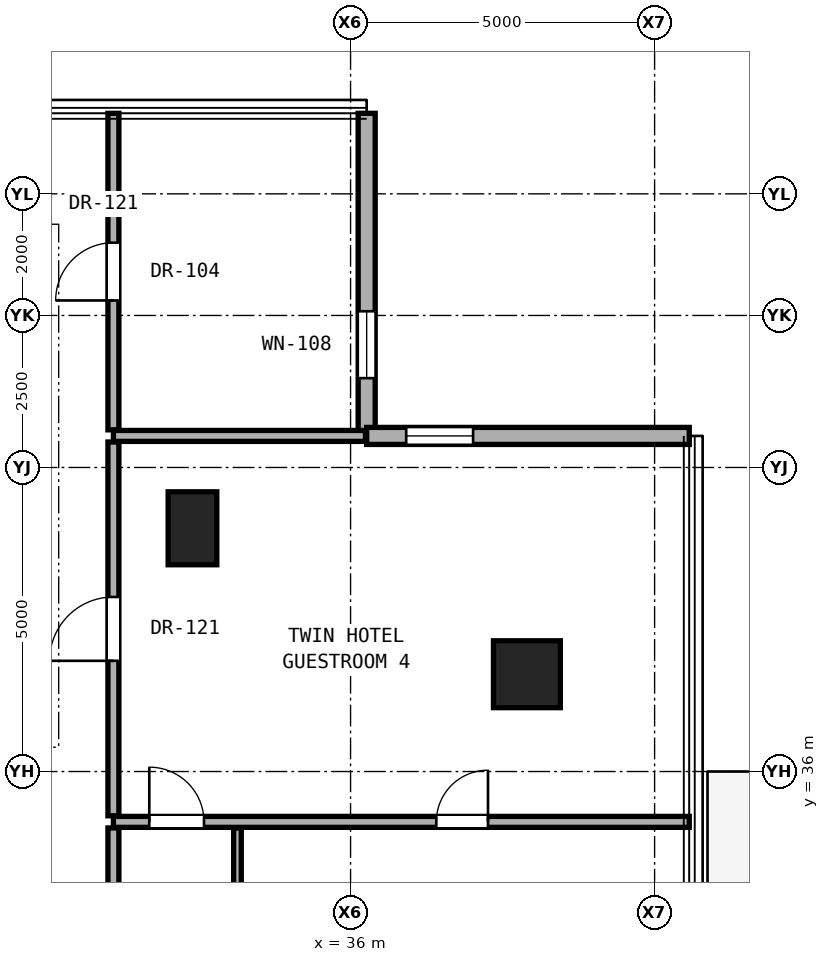
"""IFC4 building model, lengths in metres.
Left out: names, types, materials, properties, quantities, classifications, styles, units other than length and angle.
Written with IfcOpenShell. Run it as: python <this file> out.ifc"""

import sys

from ifc_helpers import new_model, si_unit, direction, frame, frame_2d, origin, origin_2d, place, context, subcontext, project, spatial, rectangle, hollow_rectangle, extrude, element, fill, save


model = new_model("IFC4")
c1 = context("Model", 3, precision=1e-05, world=origin(), true_north=direction((0.0, 1.0)))
c2 = subcontext(c1, "Body", "Model", "MODEL_VIEW")
j1 = project(units=[si_unit("LENGTHUNIT", "METRE"), si_unit("PLANEANGLEUNIT", "RADIAN")], contexts=[c1])
p1 = place(None, origin())
s1 = spatial("IfcSite", under=j1, at=p1, CompositionType="ELEMENT")
p2 = place(p1, origin())
s2 = spatial("IfcBuilding", under=s1, at=p2, CompositionType="ELEMENT")
p3 = place(p2, frame((0.0, 0.0, 98.3)))
s3 = spatial("IfcBuildingStorey", under=s2, at=p3, CompositionType="ELEMENT", Elevation=98.3)
p4 = place(p3, frame((38.9, 37.6, 0.0), z_axis=(0.0, 0.0, 1.0), x_axis=(1.0, 0.0, 0.0)))
e1 = element("IfcColumn", 1, at=p4, inside=s3, PredefinedType="COLUMN", context=c2, shape_type="SweptSolid", body=[
    extrude(hollow_rectangle(XDim=1.1, YDim=1.1, WallThickness=0.06, at=origin_2d()), origin(), (0.0, 0.0, 1.0), 3.3),
])
p5 = place(p3, frame((33.4, 40.0, 0.0), z_axis=(0.0, 0.0, 1.0), x_axis=(1.0, 0.0, 0.0)))
e2 = element("IfcColumn", 2, at=p5, inside=s3, PredefinedType="PILASTER", context=c2, shape_type="SweptSolid", body=[
    extrude(rectangle(XDim=0.8, YDim=1.2, at=origin_2d()), origin(), (0.0, 0.0, 1.0), 3.3),
])
p6 = place(p3, frame((36.265, 41.519, 0.0), z_axis=(0.0, 0.0, 1.0), x_axis=(0.0, 1.0, 0.0)))
e3 = element("IfcWall", 3, at=p6, inside=s3, PredefinedType="SOLIDWALL", context=c2, shape_type="SweptSolid", body=[
    extrude(rectangle(XDim=5.305, YDim=0.28, at=frame_2d((2.652, 0.0))), origin(), (0.0, 0.0, 1.0), 3.06),
])
p7 = place(p6, frame((0.95, 0.0, 0.85)))
e4 = element("IfcOpeningElement", 4, at=p7, cuts=e3, PredefinedType="OPENING", context=c2, shape_type="SweptSolid", body=[
    extrude(rectangle(XDim=1.1, YDim=2.0, at=frame_2d((0.55, 1.0))), frame((0.0, 0.15, 0.0), z_axis=(0.0, -1.0, 0.0), x_axis=(1.0, 0.0, 0.0)), (0.0, 0.0, 1.0), 0.3),
])
p8 = place(p3, frame((41.57, 41.519, 0.0), z_axis=(0.0, 0.0, 1.0), x_axis=(-1.0, 0.0, 0.0)))
e5 = element("IfcWall", 5, at=p8, inside=s3, PredefinedType="SOLIDWALL", context=c2, shape_type="SweptSolid", body=[
    extrude(rectangle(XDim=5.305, YDim=0.28, at=frame_2d((2.653, 0.0))), origin(), (0.0, 0.0, 1.0), 3.06),
])
p9 = place(p8, frame((3.555, 0.0, 0.85)))
e6 = element("IfcOpeningElement", 6, at=p9, cuts=e5, PredefinedType="OPENING", context=c2, shape_type="SweptSolid", body=[
    extrude(rectangle(XDim=1.1, YDim=2.0, at=frame_2d((0.55, 1.0))), frame((0.0, 0.15, 0.0), z_axis=(0.0, -1.0, 0.0), x_axis=(1.0, 0.0, 0.0)), (0.0, 0.0, 1.0), 0.3),
])
p10 = place(p3, frame((32.1, 35.172, 0.0), z_axis=(0.0, 0.0, 1.0), x_axis=(1.0, 0.0, 0.0)))
e7 = element("IfcWall", 7, at=p10, inside=s3, PredefinedType="PARTITIONING", context=c2, shape_type="SweptSolid", body=[
    extrude(rectangle(XDim=9.47, YDim=0.18, at=frame_2d((4.735, 0.0))), origin(), (0.0, 0.0, 1.0), 2.145),
])
p11 = place(p10, frame((5.31, 0.0, 0.0)))
e8 = element("IfcOpeningElement", 8, at=p11, cuts=e7, PredefinedType="OPENING", context=c2, shape_type="SweptSolid", body=[
    extrude(rectangle(XDim=0.85, YDim=2.01, at=frame_2d((0.425, 1.005))), frame((0.0, 0.1, 0.0), z_axis=(0.0, -1.0, 0.0), x_axis=(1.0, 0.0, 0.0)), (0.0, 0.0, 1.0), 0.2),
])
p12 = place(p10, frame((0.59, 0.0, 0.0)))
e9 = element("IfcOpeningElement", 9, at=p12, cuts=e7, PredefinedType="OPENING", context=c2, shape_type="SweptSolid", body=[
    extrude(rectangle(XDim=0.9, YDim=2.1, at=frame_2d((0.45, 1.05))), frame((0.0, 0.1, 0.0), z_axis=(0.0, -1.0, 0.0), x_axis=(1.0, 0.0, 0.0)), (0.0, 0.0, 1.0), 0.2),
])
p13 = place(p3, frame((32.1, 41.519, 0.0), z_axis=(0.0, 0.0, 1.0), x_axis=(1.0, 0.0, 0.0)))
e10 = element("IfcWall", 10, at=p13, inside=s3, PredefinedType="PARTITIONING", context=c2, shape_type="SweptSolid", body=[
    extrude(rectangle(XDim=4.145, YDim=0.18, at=frame_2d((2.073, 0.0))), origin(), (0.0, 0.0, 1.0), 3.08),
])
p14 = place(p3, frame((32.1, 32.972, 0.0), z_axis=(0.0, 0.0, 1.0), x_axis=(0.0, 1.0, 0.0)))
e11 = element("IfcWall", 11, at=p14, inside=s3, PredefinedType="PARTITIONING", context=c2, shape_type="SweptSolid", body=[
    extrude(rectangle(XDim=2.1, YDim=0.18, at=frame_2d((1.05, 0.0))), origin(), (0.0, 0.0, 1.0), 3.08),
])
p15 = place(p3, frame((32.1, 35.272, 0.0), z_axis=(0.0, 0.0, 1.0), x_axis=(0.0, 1.0, 0.0)))
e12 = element("IfcWall", 12, at=p15, inside=s3, PredefinedType="PARTITIONING", context=c2, shape_type="SweptSolid", body=[
    extrude(rectangle(XDim=6.147, YDim=0.18, at=frame_2d((3.073, 0.0))), origin(), (0.0, 0.0, 1.0), 2.456),
])
p16 = place(p15, frame((2.549, 0.0, 0.0)))
e13 = element("IfcOpeningElement", 13, at=p16, cuts=e12, PredefinedType="OPENING", context=c2, shape_type="SweptSolid", body=[
    extrude(rectangle(XDim=1.05, YDim=2.2, at=frame_2d((0.525, 1.1))), frame((0.0, 0.1, 0.0), z_axis=(0.0, -1.0, 0.0), x_axis=(1.0, 0.0, 0.0)), (0.0, 0.0, 1.0), 0.2),
])
p17 = place(p3, frame((32.1, 41.619, 0.0), z_axis=(0.0, 0.0, 1.0), x_axis=(0.0, 1.0, 0.0)))
e14 = element("IfcWall", 14, at=p17, inside=s3, PredefinedType="PARTITIONING", context=c2, shape_type="SweptSolid", body=[
    extrude(rectangle(XDim=5.205, YDim=0.18, at=frame_2d((2.603, 0.0))), origin(), (0.0, 0.0, 1.0), 3.08),
])
p18 = place(p17, frame((2.127, 0.0, 0.0)))
e15 = element("IfcOpeningElement", 15, at=p18, cuts=e14, PredefinedType="OPENING", context=c2, shape_type="SweptSolid", body=[
    extrude(rectangle(XDim=0.95, YDim=2.15, at=frame_2d((0.475, 1.075))), frame((0.0, 0.1, 0.0), z_axis=(0.0, -1.0, 0.0), x_axis=(1.0, 0.0, 0.0)), (0.0, 0.0, 1.0), 0.2),
])
p19 = place(p3, frame((34.14, 32.972, 0.0), z_axis=(0.0, 0.0, 1.0), x_axis=(0.0, 1.0, 0.0)))
e16 = element("IfcWall", 16, at=p19, inside=s3, PredefinedType="PARTITIONING", context=c2, shape_type="SweptSolid", body=[
    extrude(rectangle(XDim=2.1, YDim=0.125, at=frame_2d((1.05, 0.0))), origin(), (0.0, 0.0, 1.0), 3.08),
])
p20 = place(p7, origin())
e17 = element("IfcWindow", 17, at=p20, inside=s3, PartitioningType="SINGLE_PANEL", PredefinedType="WINDOW", context=c2, shape_type="SweptSolid", body=[
    extrude(rectangle(XDim=1.1, YDim=2.0, at=frame_2d((0.55, 1.0))), frame((0.0, 0.03, 0.0), z_axis=(0.0, -1.0, 0.0), x_axis=(1.0, 0.0, 0.0)), (0.0, 0.0, 1.0), 0.06),
])
fill(e4, e17)
p21 = place(p9, origin())
e18 = element("IfcWindow", 18, at=p21, inside=s3, PartitioningType="SINGLE_PANEL", PredefinedType="WINDOW", context=c2, shape_type="SweptSolid", body=[
    extrude(rectangle(XDim=1.1, YDim=2.0, at=frame_2d((0.55, 1.0))), frame((0.0, 0.03, 0.0), z_axis=(0.0, -1.0, 0.0), x_axis=(1.0, 0.0, 0.0)), (0.0, 0.0, 1.0), 0.06),
])
fill(e6, e18)
p22 = place(p16, origin())
e19 = element("IfcDoor", 19, at=p22, inside=s3, OperationType="SINGLE_SWING_LEFT", PredefinedType="DOOR", context=c2, shape_type="SweptSolid", body=[
    extrude(rectangle(XDim=1.05, YDim=2.2, at=frame_2d((0.525, 1.1))), frame((0.0, 0.025, 0.0), z_axis=(0.0, -1.0, 0.0), x_axis=(1.0, 0.0, 0.0)), (0.0, 0.0, 1.0), 0.05),
])
fill(e13, e19)
p23 = place(p11, origin())
e20 = element("IfcDoor", 20, at=p23, inside=s3, OperationType="SINGLE_SWING_RIGHT", PredefinedType="DOOR", context=c2, shape_type="SweptSolid", body=[
    extrude(rectangle(XDim=0.85, YDim=2.01, at=frame_2d((0.425, 1.005))), frame((0.0, 0.025, 0.0), z_axis=(0.0, -1.0, 0.0), x_axis=(1.0, 0.0, 0.0)), (0.0, 0.0, 1.0), 0.05),
])
fill(e8, e20)
p24 = place(p12, origin())
e21 = element("IfcDoor", 21, at=p24, inside=s3, OperationType="SINGLE_SWING_LEFT", PredefinedType="DOOR", context=c2, shape_type="SweptSolid", body=[
    extrude(rectangle(XDim=0.9, YDim=2.1, at=frame_2d((0.45, 1.05))), frame((0.0, 0.025, 0.0), z_axis=(0.0, -1.0, 0.0), x_axis=(1.0, 0.0, 0.0)), (0.0, 0.0, 1.0), 0.05),
])
fill(e9, e21)
p25 = place(p18, origin())
e22 = element("IfcDoor", 22, at=p25, inside=s3, OperationType="SINGLE_SWING_LEFT", PredefinedType="DOOR", context=c2, shape_type="SweptSolid", body=[
    extrude(rectangle(XDim=0.95, YDim=2.15, at=frame_2d((0.475, 1.075))), frame((0.0, 0.025, 0.0), z_axis=(0.0, -1.0, 0.0), x_axis=(1.0, 0.0, 0.0)), (0.0, 0.0, 1.0), 0.05),
])
fill(e15, e22)
save(model, sys.argv[1])
